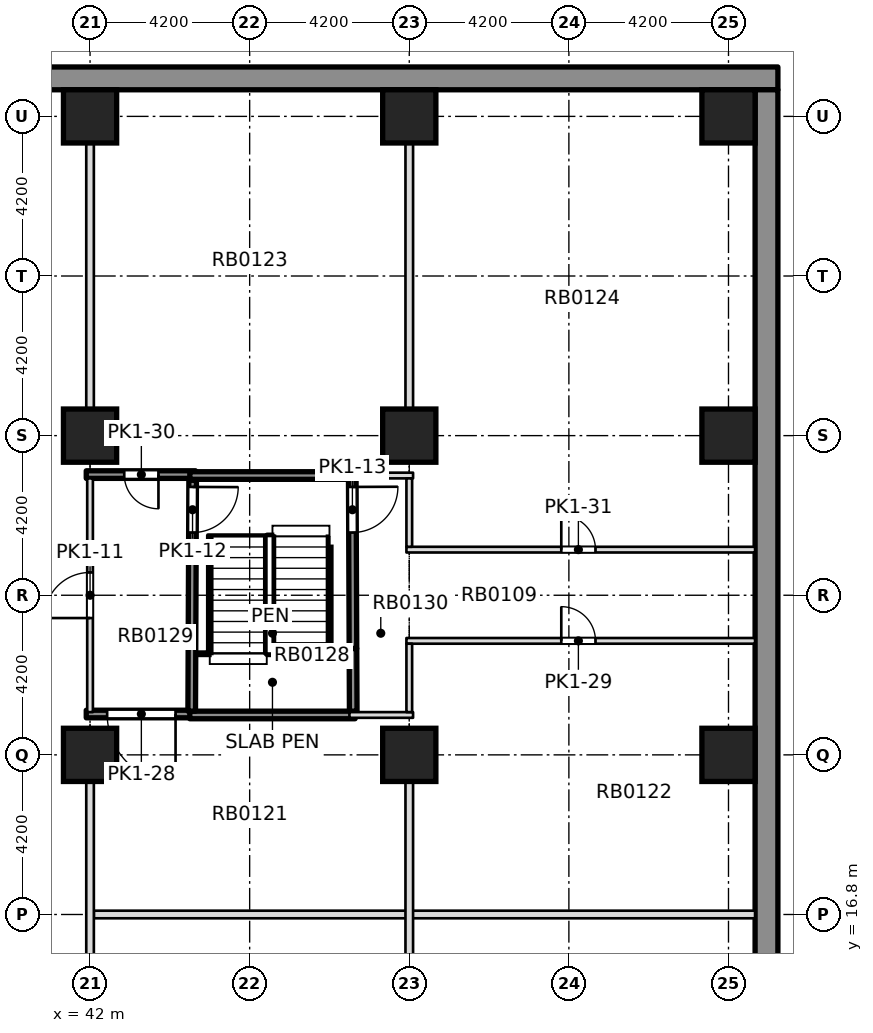
"""IFC4 building model, lengths in metres.
Left out: names, types, materials, properties, quantities, classifications, styles, units other than length and angle.
Written with IfcOpenShell. Run it as: python <this file> out.ifc"""

import sys

from ifc_helpers import new_model, si_unit, direction, frame, frame_2d, origin, origin_2d, place, context, subcontext, project, spatial, rectangle, extrude, element, fill, save


model = new_model("IFC4")
c1 = context("Model", 3, precision=1e-05, world=origin(), true_north=direction((0.0, 1.0)))
c2 = subcontext(c1, "Body", "Model", "MODEL_VIEW")
j1 = project(units=[si_unit("LENGTHUNIT", "METRE"), si_unit("PLANEANGLEUNIT", "RADIAN")], contexts=[c1])
p1 = place(None, origin())
s1 = spatial("IfcSite", under=j1, at=p1, CompositionType="ELEMENT")
p2 = place(p1, origin())
s2 = spatial("IfcBuilding", under=s1, at=p2, CompositionType="ELEMENT")
p3 = place(p2, frame((0.0, 0.0, -4.2)))
s3 = spatial("IfcBuildingStorey", under=s2, at=p3, CompositionType="ELEMENT", Elevation=-4.2)
p4 = place(p3, frame((-43.3, 38.8, 0.0), z_axis=(0.0, 0.0, 1.0), x_axis=(1.0, 0.0, 0.0)))
e1 = element("IfcWall", 1, at=p4, inside=s3, PredefinedType="SOLIDWALL", context=c2, shape_type="SweptSolid", body=[
    extrude(rectangle(XDim=103.4, YDim=0.6, at=frame_2d((51.7, 0.0))), origin(), (0.0, 0.0, 1.0), 4.2),
])
p5 = place(p3, frame((59.8, -38.5, 0.0), z_axis=(0.0, 0.0, 1.0), x_axis=(0.0, 1.0, 0.0)))
e2 = element("IfcWall", 2, at=p5, inside=s3, PredefinedType="SOLIDWALL", context=c2, shape_type="SweptSolid", body=[
    extrude(rectangle(XDim=77.0, YDim=0.6, at=frame_2d((38.5, 0.0))), origin(), (0.0, 0.0, 1.0), 4.2),
])
for number, where, z_axis, x_axis in (
    (3, (42.0, 21.0, 0.0), (0.0, 0.0, 1.0), (1.0, 0.0, 0.0)),
    (4, (50.4, 21.0, 0.0), (0.0, 0.0, 1.0), (1.0, 0.0, 0.0)),
    (5, (58.8, 21.0, 0.0), (0.0, 0.0, 1.0), (1.0, 0.0, 0.0)),
    (6, (42.0, 29.4, 0.0), (0.0, 0.0, 1.0), (1.0, 0.0, 0.0)),
    (7, (50.4, 29.4, 0.0), (0.0, 0.0, 1.0), (1.0, 0.0, 0.0)),
    (8, (58.8, 29.4, 0.0), (0.0, 0.0, 1.0), (1.0, 0.0, 0.0)),
):
    element("IfcColumn", number, at=place(p3, frame(where, z_axis=z_axis, x_axis=x_axis)), inside=s3, PredefinedType="COLUMN", context=c2, shape_type="SweptSolid", body=[
        extrude(rectangle(XDim=1.4, YDim=1.4, at=origin_2d()), origin(), (0.0, 0.0, 1.0), 4.2),
    ])
for number, where, z_axis, x_axis in (
    (9, (42.0, 37.8, 0.0), (0.0, 0.0, 1.0), (1.0, 0.0, 0.0)),
    (10, (50.4, 37.8, 0.0), (0.0, 0.0, 1.0), (1.0, 0.0, 0.0)),
    (11, (58.8, 37.8, 0.0), (0.0, 0.0, 1.0), (1.0, 0.0, 0.0)),
):
    element("IfcColumn", number, at=place(p3, frame(where, z_axis=z_axis, x_axis=x_axis)), inside=s3, PredefinedType="COLUMN", context=c2, shape_type="SweptSolid", body=[
        extrude(rectangle(XDim=1.4, YDim=1.4, at=origin_2d()), origin(), (0.0, 0.0, 1.0), 3.75),
    ])
p6 = place(p3, frame((42.1, 16.8, 0.0), z_axis=(0.0, 0.0, 1.0), x_axis=(1.0, 0.0, 0.0)))
e12 = element("IfcWall", 12, at=p6, inside=s3, PredefinedType="PARTITIONING", context=c2, shape_type="SweptSolid", body=[
    extrude(rectangle(XDim=17.399, YDim=0.2, at=frame_2d((8.699, 0.0))), origin(), (0.0, 0.0, 1.0), 3.75),
])
p7 = place(p3, frame((41.9, 22.075, 0.0), z_axis=(0.0, 0.0, 1.0), x_axis=(1.0, 0.0, 0.0)))
e13 = element("IfcWall", 13, at=p7, inside=s3, PredefinedType="SOLIDWALL", context=c2, shape_type="SweptSolid", body=[
    extrude(rectangle(XDim=2.875, YDim=0.2, at=frame_2d((1.438, 0.0))), origin(), (0.0, 0.0, 1.0), 3.75),
])
p8 = place(p7, frame((0.55, 0.0, 0.0)))
e14 = element("IfcOpeningElement", 14, at=p8, cuts=e13, PredefinedType="OPENING", context=c2, shape_type="SweptSolid", body=[
    extrude(rectangle(XDim=1.8, YDim=2.1, at=frame_2d((0.9, 1.05))), frame((0.0, 0.11, 0.0), z_axis=(0.0, -1.0, 0.0), x_axis=(1.0, 0.0, 0.0)), (0.0, 0.0, 1.0), 0.22),
])
p9 = place(p3, frame((44.625, 22.05, 0.0), z_axis=(0.0, 0.0, 1.0), x_axis=(1.0, 0.0, 0.0)))
e15 = element("IfcWall", 15, at=p9, inside=s3, PredefinedType="SOLIDWALL", context=c2, shape_type="SweptSolid", body=[
    extrude(rectangle(XDim=4.35, YDim=0.2, at=frame_2d((2.175, 0.0))), origin(), (0.0, 0.0, 1.0), 3.75),
])
p10 = place(p3, frame((48.825, 22.05, 0.0), z_axis=(0.0, 0.0, 1.0), x_axis=(1.0, 0.0, 0.0)))
e16 = element("IfcWall", 16, at=p10, inside=s3, PredefinedType="PARTITIONING", context=c2, shape_type="SweptSolid", body=[
    extrude(rectangle(XDim=1.675, YDim=0.15, at=frame_2d((0.837, 0.0))), origin(), (0.0, 0.0, 1.0), 3.75),
])
p11 = place(p3, frame((50.325, 24.0, 0.0), z_axis=(0.0, 0.0, 1.0), x_axis=(1.0, 0.0, 0.0)))
e17 = element("IfcWall", 17, at=p11, inside=s3, PredefinedType="PARTITIONING", context=c2, shape_type="SweptSolid", body=[
    extrude(rectangle(XDim=9.174, YDim=0.15, at=frame_2d((4.587, 0.0))), origin(), (0.0, 0.0, 1.0), 3.75),
])
p12 = place(p11, frame((4.075, 0.0, 0.0)))
e18 = element("IfcOpeningElement", 18, at=p12, cuts=e17, PredefinedType="OPENING", context=c2, shape_type="SweptSolid", body=[
    extrude(rectangle(XDim=0.9, YDim=2.1, at=frame_2d((0.45, 1.05))), frame((0.0, 0.085, 0.0), z_axis=(0.0, -1.0, 0.0), x_axis=(1.0, 0.0, 0.0)), (0.0, 0.0, 1.0), 0.17),
])
p13 = place(p3, frame((50.325, 26.4, 0.0), z_axis=(0.0, 0.0, 1.0), x_axis=(1.0, 0.0, 0.0)))
e19 = element("IfcWall", 19, at=p13, inside=s3, PredefinedType="PARTITIONING", context=c2, shape_type="SweptSolid", body=[
    extrude(rectangle(XDim=9.174, YDim=0.15, at=frame_2d((4.587, 0.0))), origin(), (0.0, 0.0, 1.0), 3.75),
])
p14 = place(p13, frame((4.075, 0.0, 0.0)))
e20 = element("IfcOpeningElement", 20, at=p14, cuts=e19, PredefinedType="OPENING", context=c2, shape_type="SweptSolid", body=[
    extrude(rectangle(XDim=0.9, YDim=2.1, at=frame_2d((0.45, 1.05))), frame((0.0, 0.085, 0.0), z_axis=(0.0, -1.0, 0.0), x_axis=(1.0, 0.0, 0.0)), (0.0, 0.0, 1.0), 0.17),
])
p15 = place(p3, frame((41.9, 28.375, 0.0), z_axis=(0.0, 0.0, 1.0), x_axis=(1.0, 0.0, 0.0)))
e21 = element("IfcWall", 21, at=p15, inside=s3, PredefinedType="SOLIDWALL", context=c2, shape_type="SweptSolid", body=[
    extrude(rectangle(XDim=2.875, YDim=0.2, at=frame_2d((1.438, 0.0))), origin(), (0.0, 0.0, 1.0), 3.75),
])
p16 = place(p15, frame((1.0, 0.0, 0.0)))
e22 = element("IfcOpeningElement", 22, at=p16, cuts=e21, PredefinedType="OPENING", context=c2, shape_type="SweptSolid", body=[
    extrude(rectangle(XDim=0.9, YDim=2.1, at=frame_2d((0.45, 1.05))), frame((0.0, 0.11, 0.0), z_axis=(0.0, -1.0, 0.0), x_axis=(1.0, 0.0, 0.0)), (0.0, 0.0, 1.0), 0.22),
])
p17 = place(p3, frame((44.625, 28.35, 0.0), z_axis=(0.0, 0.0, 1.0), x_axis=(1.0, 0.0, 0.0)))
e23 = element("IfcWall", 23, at=p17, inside=s3, PredefinedType="SOLIDWALL", context=c2, shape_type="SweptSolid", body=[
    extrude(rectangle(XDim=4.35, YDim=0.2, at=frame_2d((2.175, 0.0))), origin(), (0.0, 0.0, 1.0), 3.75),
])
p18 = place(p3, frame((48.825, 28.35, 0.0), z_axis=(0.0, 0.0, 1.0), x_axis=(1.0, 0.0, 0.0)))
e24 = element("IfcWall", 24, at=p18, inside=s3, PredefinedType="PARTITIONING", context=c2, shape_type="SweptSolid", body=[
    extrude(rectangle(XDim=1.675, YDim=0.15, at=frame_2d((0.837, 0.0))), origin(), (0.0, 0.0, 1.0), 3.75),
])
p19 = place(p3, frame((42.0, 13.3, 0.0), z_axis=(0.0, 0.0, 1.0), x_axis=(0.0, 1.0, 0.0)))
e25 = element("IfcWall", 25, at=p19, inside=s3, PredefinedType="PARTITIONING", context=c2, shape_type="SweptSolid", body=[
    extrude(rectangle(XDim=7.0, YDim=0.2, at=frame_2d((3.5, 0.0))), origin(), (0.0, 0.0, 1.0), 3.75),
])
p20 = place(p3, frame((42.0, 22.125, 0.0), z_axis=(0.0, 0.0, 1.0), x_axis=(0.0, 1.0, 0.0)))
e26 = element("IfcWall", 26, at=p20, inside=s3, PredefinedType="PARTITIONING", context=c2, shape_type="SweptSolid", body=[
    extrude(rectangle(XDim=6.15, YDim=0.15, at=frame_2d((3.075, 0.0))), origin(), (0.0, 0.0, 1.0), 3.75),
])
p21 = place(p20, frame((2.475, 0.0, 0.0)))
e27 = element("IfcOpeningElement", 27, at=p21, cuts=e26, PredefinedType="OPENING", context=c2, shape_type="SweptSolid", body=[
    extrude(rectangle(XDim=1.2, YDim=2.1, at=frame_2d((0.6, 1.05))), frame((0.0, 0.085, 0.0), z_axis=(0.0, -1.0, 0.0), x_axis=(1.0, 0.0, 0.0)), (0.0, 0.0, 1.0), 0.17),
])
p22 = place(p3, frame((42.0, 30.1, 0.0), z_axis=(0.0, 0.0, 1.0), x_axis=(0.0, 1.0, 0.0)))
e28 = element("IfcWall", 28, at=p22, inside=s3, PredefinedType="PARTITIONING", context=c2, shape_type="SweptSolid", body=[
    extrude(rectangle(XDim=7.0, YDim=0.2, at=frame_2d((3.5, 0.0))), origin(), (0.0, 0.0, 1.0), 3.75),
])
p23 = place(p3, frame((44.675, 22.15, 0.0), z_axis=(0.0, 0.0, 1.0), x_axis=(0.004098985015, 0.999991599126, 0.0)))
e29 = element("IfcWall", 29, at=p23, inside=s3, PredefinedType="SOLIDWALL", context=c2, shape_type="SweptSolid", body=[
    extrude(rectangle(XDim=6.075, YDim=0.2, at=frame_2d((3.038, 0.0))), origin(), (0.0, 0.0, 1.0), 3.75),
])
p24 = place(p23, frame((4.7, 0.0, 0.0)))
e30 = element("IfcOpeningElement", 30, at=p24, cuts=e29, PredefinedType="OPENING", context=c2, shape_type="SweptSolid", body=[
    extrude(rectangle(XDim=1.2, YDim=2.1, at=frame_2d((0.6, 1.05))), frame((0.0, 0.11, 0.0), z_axis=(0.0, -1.0, 0.0), x_axis=(1.0, 0.0, 0.0)), (0.0, 0.0, 1.0), 0.22),
])
p25 = place(p3, frame((48.925, 22.15, 0.0), z_axis=(0.0, 0.0, 1.0), x_axis=(-0.003995232985, 0.999992019025, 0.0)))
e31 = element("IfcWall", 31, at=p25, inside=s3, PredefinedType="SOLIDWALL", context=c2, shape_type="SweptSolid", body=[
    extrude(rectangle(XDim=1.65, YDim=0.2, at=frame_2d((0.825, 0.0))), origin(), (0.0, 0.0, 1.0), 3.75),
])
p26 = place(p3, frame((50.4, 13.3, 0.0), z_axis=(0.0, 0.0, 1.0), x_axis=(0.0, 1.0, 0.0)))
e32 = element("IfcWall", 32, at=p26, inside=s3, PredefinedType="PARTITIONING", context=c2, shape_type="SweptSolid", body=[
    extrude(rectangle(XDim=7.0, YDim=0.2, at=frame_2d((3.5, 0.0))), origin(), (0.0, 0.0, 1.0), 3.75),
])
p27 = place(p3, frame((50.4, 22.125, 0.0), z_axis=(0.0, 0.0, 1.0), x_axis=(0.0, 1.0, 0.0)))
e33 = element("IfcWall", 33, at=p27, inside=s3, PredefinedType="PARTITIONING", context=c2, shape_type="SweptSolid", body=[
    extrude(rectangle(XDim=1.8, YDim=0.15, at=frame_2d((0.9, 0.0))), origin(), (0.0, 0.0, 1.0), 3.75),
])
p28 = place(p3, frame((50.4, 26.475, 0.0), z_axis=(0.0, 0.0, 1.0), x_axis=(0.0, 1.0, 0.0)))
e34 = element("IfcWall", 34, at=p28, inside=s3, PredefinedType="PARTITIONING", context=c2, shape_type="SweptSolid", body=[
    extrude(rectangle(XDim=1.8, YDim=0.15, at=frame_2d((0.9, 0.0))), origin(), (0.0, 0.0, 1.0), 3.75),
])
p29 = place(p3, frame((50.4, 30.1, 0.0), z_axis=(0.0, 0.0, 1.0), x_axis=(0.0, 1.0, 0.0)))
e35 = element("IfcWall", 35, at=p29, inside=s3, PredefinedType="PARTITIONING", context=c2, shape_type="SweptSolid", body=[
    extrude(rectangle(XDim=7.0, YDim=0.2, at=frame_2d((3.5, 0.0))), origin(), (0.0, 0.0, 1.0), 3.75),
])
p30 = place(p3, frame((48.918, 23.8, 0.0), z_axis=(0.0, 0.0, 1.0), x_axis=(-0.004091618778, 0.999991629293, 0.0)))
e36 = element("IfcWall", 36, at=p30, inside=s3, PredefinedType="SOLIDWALL", context=c2, shape_type="SweptSolid", body=[
    extrude(rectangle(XDim=4.475, YDim=0.2, at=frame_2d((2.238, 0.0))), origin(), (0.0, 0.0, 1.0), 3.75),
])
p31 = place(p30, frame((3.05, 0.0, 0.0)))
e37 = element("IfcOpeningElement", 37, at=p31, cuts=e36, PredefinedType="OPENING", context=c2, shape_type="SweptSolid", body=[
    extrude(rectangle(XDim=1.2, YDim=2.1, at=frame_2d((0.6, 1.05))), frame((0.0, 0.11, 0.0), z_axis=(0.0, -1.0, 0.0), x_axis=(1.0, 0.0, 0.0)), (0.0, 0.0, 1.0), 0.22),
])
p32 = place(p21, origin())
e38 = element("IfcDoor", 38, at=p32, inside=s3, OperationType="DOUBLE_DOOR_SINGLE_SWING", PredefinedType="DOOR", context=c2, shape_type="SweptSolid", body=[
    extrude(rectangle(XDim=1.2, YDim=2.1, at=frame_2d((0.6, 1.05))), frame((0.0, 0.025, 0.0), z_axis=(0.0, -1.0, 0.0), x_axis=(1.0, 0.0, 0.0)), (0.0, 0.0, 1.0), 0.05),
])
fill(e27, e38)
p33 = place(p24, origin())
e39 = element("IfcDoor", 39, at=p33, inside=s3, OperationType="DOUBLE_DOOR_SINGLE_SWING", PredefinedType="DOOR", context=c2, shape_type="SweptSolid", body=[
    extrude(rectangle(XDim=1.2, YDim=2.1, at=frame_2d((0.6, 1.05))), frame((0.0, 0.025, 0.0), z_axis=(0.0, -1.0, 0.0), x_axis=(1.0, 0.0, 0.0)), (0.0, 0.0, 1.0), 0.05),
])
fill(e30, e39)
p34 = place(p31, origin())
e40 = element("IfcDoor", 40, at=p34, inside=s3, OperationType="DOUBLE_DOOR_SINGLE_SWING", PredefinedType="DOOR", context=c2, shape_type="SweptSolid", body=[
    extrude(rectangle(XDim=1.2, YDim=2.1, at=frame_2d((0.6, 1.05))), frame((0.0, 0.025, 0.0), z_axis=(0.0, -1.0, 0.0), x_axis=(1.0, 0.0, 0.0)), (0.0, 0.0, 1.0), 0.05),
])
fill(e37, e40)
p35 = place(p8, origin())
e41 = element("IfcDoor", 41, at=p35, inside=s3, OperationType="DOUBLE_DOOR_SINGLE_SWING", PredefinedType="DOOR", context=c2, shape_type="SweptSolid", body=[
    extrude(rectangle(XDim=1.8, YDim=2.1, at=frame_2d((0.9, 1.05))), frame((0.0, 0.025, 0.0), z_axis=(0.0, -1.0, 0.0), x_axis=(1.0, 0.0, 0.0)), (0.0, 0.0, 1.0), 0.05),
])
fill(e14, e41)
p36 = place(p12, origin())
e42 = element("IfcDoor", 42, at=p36, inside=s3, OperationType="SINGLE_SWING_RIGHT", PredefinedType="DOOR", context=c2, shape_type="SweptSolid", body=[
    extrude(rectangle(XDim=0.9, YDim=2.1, at=frame_2d((0.45, 1.05))), frame((0.0, 0.025, 0.0), z_axis=(0.0, -1.0, 0.0), x_axis=(1.0, 0.0, 0.0)), (0.0, 0.0, 1.0), 0.05),
])
fill(e18, e42)
p37 = place(p16, origin())
e43 = element("IfcDoor", 43, at=p37, inside=s3, OperationType="SINGLE_SWING_LEFT", PredefinedType="DOOR", context=c2, shape_type="SweptSolid", body=[
    extrude(rectangle(XDim=0.9, YDim=2.1, at=frame_2d((0.45, 1.05))), frame((0.0, 0.025, 0.0), z_axis=(0.0, -1.0, 0.0), x_axis=(1.0, 0.0, 0.0)), (0.0, 0.0, 1.0), 0.05),
])
fill(e22, e43)
p38 = place(p14, origin())
e44 = element("IfcDoor", 44, at=p38, inside=s3, OperationType="SINGLE_SWING_RIGHT", PredefinedType="DOOR", context=c2, shape_type="SweptSolid", body=[
    extrude(rectangle(XDim=0.9, YDim=2.1, at=frame_2d((0.45, 1.05))), frame((0.0, 0.025, 0.0), z_axis=(0.0, -1.0, 0.0), x_axis=(1.0, 0.0, 0.0)), (0.0, 0.0, 1.0), 0.05),
])
fill(e20, e44)
save(model, sys.argv[1])
